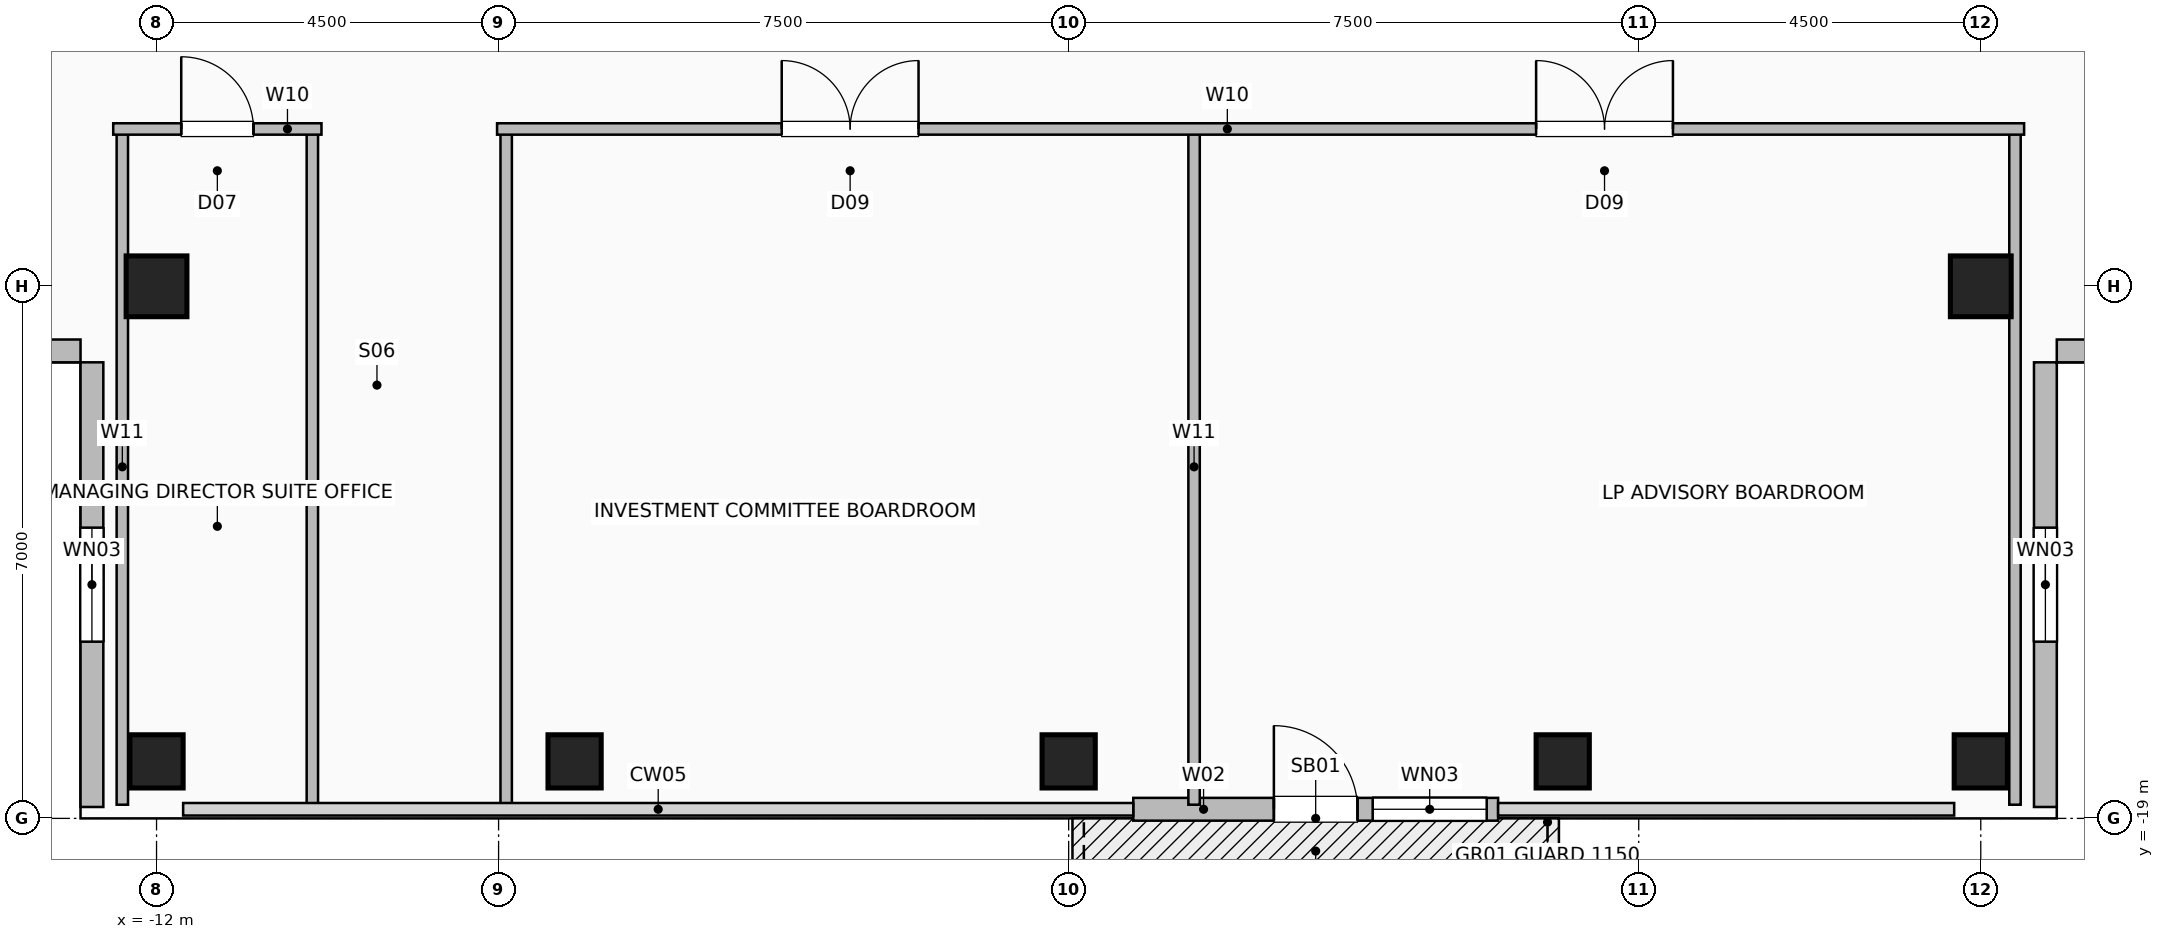
"""IFC4 building model, lengths in metres.
Left out: names, types, materials, properties, quantities, classifications, styles, units other than length and angle.
Written with IfcOpenShell. Run it as: python <this file> out.ifc"""

import sys

from ifc_helpers import new_model, si_unit, direction, frame, frame_2d, origin, origin_2d, place, context, subcontext, project, spatial, rectangle, hollow_rectangle, extrude, element, fill, save


model = new_model("IFC4")
c1 = context("Model", 3, precision=1e-05, world=origin(), true_north=direction((0.0, 1.0)))
c2 = subcontext(c1, "Body", "Model", "MODEL_VIEW")
j1 = project(units=[si_unit("LENGTHUNIT", "METRE"), si_unit("PLANEANGLEUNIT", "RADIAN")], contexts=[c1])
p1 = place(None, origin())
s1 = spatial("IfcSite", under=j1, at=p1, CompositionType="ELEMENT")
p2 = place(p1, origin())
s2 = spatial("IfcBuilding", under=s1, at=p2, CompositionType="ELEMENT")
p3 = place(p2, frame((0.0, 0.0, 275.6)))
s3 = spatial("IfcBuildingStorey", under=s2, at=p3, CompositionType="ELEMENT", Elevation=275.6)
for number, where, z_axis, x_axis in (
    (1, (-12.0, -18.25, 0.0), (0.0, 0.0, 1.0), (1.0, 0.0, 0.0)),
    (2, (-6.5, -18.25, 0.0), (0.0, 0.0, 1.0), (1.0, 0.0, 0.0)),
    (3, (0.0, -18.25, 0.0), (0.0, 0.0, 1.0), (1.0, 0.0, 0.0)),
    (4, (6.5, -18.25, 0.0), (0.0, 0.0, 1.0), (1.0, 0.0, 0.0)),
    (5, (12.0, -18.25, 0.0), (0.0, 0.0, 1.0), (1.0, 0.0, 0.0)),
):
    element("IfcColumn", number, at=place(p3, frame(where, z_axis=z_axis, x_axis=x_axis)), inside=s3, PredefinedType="COLUMN", context=c2, shape_type="SweptSolid", body=[
        extrude(hollow_rectangle(XDim=0.7, YDim=0.7, WallThickness=0.035, at=origin_2d()), origin(), (0.0, 0.0, 1.0), 3.6),
    ])
for number, where, z_axis, x_axis in (
    (6, (-12.0, -12.0, 0.0), (0.0, 0.0, 1.0), (1.0, 0.0, 0.0)),
    (7, (12.0, -12.0, 0.0), (0.0, 0.0, 1.0), (1.0, 0.0, 0.0)),
):
    element("IfcColumn", number, at=place(p3, frame(where, z_axis=z_axis, x_axis=x_axis)), inside=s3, PredefinedType="COLUMN", context=c2, shape_type="SweptSolid", body=[
        extrude(hollow_rectangle(XDim=0.8, YDim=0.8, WallThickness=0.04, at=origin_2d()), origin(), (0.0, 0.0, 1.0), 3.6),
    ])
p4 = place(p3, frame((0.85, -18.88, 0.0), z_axis=(0.0, 0.0, 1.0), x_axis=(1.0, 0.0, 0.0)))
e8 = element("IfcWall", 8, at=p4, inside=s3, PredefinedType="SOLIDWALL", context=c2, shape_type="SweptSolid", body=[
    extrude(rectangle(XDim=4.8, YDim=0.3, at=frame_2d((2.4, 0.0))), origin(), (0.0, 0.0, 1.0), 3.36),
])
p5 = place(p4, frame((1.85, 0.0, 0.0)))
e9 = element("IfcOpeningElement", 9, at=p5, cuts=e8, PredefinedType="OPENING", context=c2, shape_type="SweptSolid", body=[
    extrude(rectangle(XDim=1.1, YDim=2.2, at=frame_2d((0.55, 1.1))), frame((0.0, 0.16, 0.0), z_axis=(0.0, -1.0, 0.0), x_axis=(1.0, 0.0, 0.0)), (0.0, 0.0, 1.0), 0.32),
])
p6 = place(p4, frame((3.15, 0.0, 0.85)))
e10 = element("IfcOpeningElement", 10, at=p6, cuts=e8, PredefinedType="OPENING", context=c2, shape_type="SweptSolid", body=[
    extrude(rectangle(XDim=1.5, YDim=1.8, at=frame_2d((0.75, 0.9))), frame((0.0, 0.16, 0.0), z_axis=(0.0, -1.0, 0.0), x_axis=(1.0, 0.0, 0.0)), (0.0, 0.0, 1.0), 0.32),
])
p7 = place(p3, frame((-12.85, -18.85, 0.0), z_axis=(0.0, 0.0, 1.0), x_axis=(0.0, 1.0, 0.0)))
e11 = element("IfcWall", 11, at=p7, inside=s3, PredefinedType="SOLIDWALL", context=c2, shape_type="SweptSolid", body=[
    extrude(rectangle(XDim=5.85, YDim=0.3, at=frame_2d((2.925, 0.0))), origin(), (0.0, 0.0, 1.0), 3.36),
])
p8 = place(p7, frame((2.175, 0.0, 0.9)))
e12 = element("IfcOpeningElement", 12, at=p8, cuts=e11, PredefinedType="OPENING", context=c2, shape_type="SweptSolid", body=[
    extrude(rectangle(XDim=1.5, YDim=1.8, at=frame_2d((0.75, 0.9))), frame((0.0, 0.16, 0.0), z_axis=(0.0, -1.0, 0.0), x_axis=(1.0, 0.0, 0.0)), (0.0, 0.0, 1.0), 0.32),
])
p9 = place(p3, frame((-18.85, -12.85, 0.0), z_axis=(0.0, 0.0, 1.0), x_axis=(1.0, 0.0, 0.0)))
e13 = element("IfcWall", 13, at=p9, inside=s3, PredefinedType="SOLIDWALL", context=c2, shape_type="SweptSolid", body=[
    extrude(rectangle(XDim=5.85, YDim=0.3, at=frame_2d((2.925, 0.0))), origin(), (0.0, 0.0, 1.0), 3.36),
])
p10 = place(p3, frame((12.85, -18.85, 0.0), z_axis=(0.0, 0.0, 1.0), x_axis=(0.0, 1.0, 0.0)))
e14 = element("IfcWall", 14, at=p10, inside=s3, PredefinedType="SOLIDWALL", context=c2, shape_type="SweptSolid", body=[
    extrude(rectangle(XDim=5.85, YDim=0.3, at=frame_2d((2.925, 0.0))), origin(), (0.0, 0.0, 1.0), 3.36),
])
p11 = place(p10, frame((2.175, 0.0, 0.9)))
e15 = element("IfcOpeningElement", 15, at=p11, cuts=e14, PredefinedType="OPENING", context=c2, shape_type="SweptSolid", body=[
    extrude(rectangle(XDim=1.5, YDim=1.8, at=frame_2d((0.75, 0.9))), frame((0.0, 0.16, 0.0), z_axis=(0.0, -1.0, 0.0), x_axis=(1.0, 0.0, 0.0)), (0.0, 0.0, 1.0), 0.32),
])
p12 = place(p3, frame((18.85, -12.85, 0.0), z_axis=(0.0, 0.0, 1.0), x_axis=(-1.0, 0.0, 0.0)))
e16 = element("IfcWall", 16, at=p12, inside=s3, PredefinedType="SOLIDWALL", context=c2, shape_type="SweptSolid", body=[
    extrude(rectangle(XDim=5.85, YDim=0.3, at=frame_2d((2.925, 0.0))), origin(), (0.0, 0.0, 1.0), 3.36),
])
for number, where, z_axis, x_axis in (
    (17, (-12.45, -18.82, 0.0), (0.0, 0.0, 1.0), (0.0, 1.0, 0.0)),
    (18, (-9.95, -18.82, 0.0), (0.0, 0.0, 1.0), (0.0, 1.0, 0.0)),
):
    element("IfcWall", number, at=place(p3, frame(where, z_axis=z_axis, x_axis=x_axis)), inside=s3, PredefinedType="PARTITIONING", context=c2, shape_type="SweptSolid", body=[
        extrude(rectangle(XDim=8.89, YDim=0.15, at=frame_2d((4.445, 0.0))), origin(), (0.0, 0.0, 1.0), 3.36),
    ])
p13 = place(p3, frame((-12.57, -9.93, 0.0), z_axis=(0.0, 0.0, 1.0), x_axis=(1.0, 0.0, 0.0)))
e19 = element("IfcWall", 19, at=p13, inside=s3, PredefinedType="PARTITIONING", context=c2, shape_type="SweptSolid", body=[
    extrude(rectangle(XDim=2.74, YDim=0.15, at=frame_2d((1.37, 0.0))), origin(), (0.0, 0.0, 1.0), 3.36),
])
p14 = place(p13, frame((0.895, 0.0, 0.0)))
e20 = element("IfcOpeningElement", 20, at=p14, cuts=e19, PredefinedType="OPENING", context=c2, shape_type="SweptSolid", body=[
    extrude(rectangle(XDim=0.95, YDim=2.06, at=frame_2d((0.475, 1.03))), frame((0.0, 0.085, 0.0), z_axis=(0.0, -1.0, 0.0), x_axis=(1.0, 0.0, 0.0)), (0.0, 0.0, 1.0), 0.17),
])
for number, where, z_axis, x_axis in (
    (21, (-7.4, -18.82, 0.0), (0.0, 0.0, 1.0), (0.0, 1.0, 0.0)),
    (22, (1.65, -18.82, 0.0), (0.0, 0.0, 1.0), (0.0, 1.0, 0.0)),
    (23, (12.45, -18.82, 0.0), (0.0, 0.0, 1.0), (0.0, 1.0, 0.0)),
):
    element("IfcWall", number, at=place(p3, frame(where, z_axis=z_axis, x_axis=x_axis)), inside=s3, PredefinedType="PARTITIONING", context=c2, shape_type="SweptSolid", body=[
        extrude(rectangle(XDim=8.89, YDim=0.15, at=frame_2d((4.445, 0.0))), origin(), (0.0, 0.0, 1.0), 3.36),
    ])
p15 = place(p3, frame((-7.52, -9.93, 0.0), z_axis=(0.0, 0.0, 1.0), x_axis=(1.0, 0.0, 0.0)))
e24 = element("IfcWall", 24, at=p15, inside=s3, PredefinedType="PARTITIONING", context=c2, shape_type="SweptSolid", body=[
    extrude(rectangle(XDim=20.09, YDim=0.15, at=frame_2d((10.045, 0.0))), origin(), (0.0, 0.0, 1.0), 3.36),
])
p16 = place(p15, frame((3.745, 0.0, 0.0)))
e25 = element("IfcOpeningElement", 25, at=p16, cuts=e24, PredefinedType="OPENING", context=c2, shape_type="SweptSolid", body=[
    extrude(rectangle(XDim=1.8, YDim=2.08, at=frame_2d((0.9, 1.04))), frame((0.0, 0.085, 0.0), z_axis=(0.0, -1.0, 0.0), x_axis=(1.0, 0.0, 0.0)), (0.0, 0.0, 1.0), 0.17),
])
p17 = place(p15, frame((13.67, 0.0, 0.0)))
e26 = element("IfcOpeningElement", 26, at=p17, cuts=e24, PredefinedType="OPENING", context=c2, shape_type="SweptSolid", body=[
    extrude(rectangle(XDim=1.8, YDim=2.08, at=frame_2d((0.9, 1.04))), frame((0.0, 0.085, 0.0), z_axis=(0.0, -1.0, 0.0), x_axis=(1.0, 0.0, 0.0)), (0.0, 0.0, 1.0), 0.17),
])
p18 = place(p5, origin())
e27 = element("IfcDoor", 27, at=p18, inside=s3, OperationType="SINGLE_SWING_LEFT", PredefinedType="DOOR", context=c2, shape_type="SweptSolid", body=[
    extrude(rectangle(XDim=1.1, YDim=2.2, at=frame_2d((0.55, 1.1))), frame((0.0, 0.025, 0.0), z_axis=(0.0, -1.0, 0.0), x_axis=(1.0, 0.0, 0.0)), (0.0, 0.0, 1.0), 0.05),
])
fill(e9, e27)
p19 = place(p6, origin())
e28 = element("IfcWindow", 28, at=p19, inside=s3, PartitioningType="SINGLE_PANEL", PredefinedType="WINDOW", context=c2, shape_type="SweptSolid", body=[
    extrude(rectangle(XDim=1.5, YDim=1.8, at=frame_2d((0.75, 0.9))), frame((0.0, 0.03, 0.0), z_axis=(0.0, -1.0, 0.0), x_axis=(1.0, 0.0, 0.0)), (0.0, 0.0, 1.0), 0.06),
])
fill(e10, e28)
p20 = place(p8, origin())
e29 = element("IfcWindow", 29, at=p20, inside=s3, PartitioningType="SINGLE_PANEL", PredefinedType="WINDOW", context=c2, shape_type="SweptSolid", body=[
    extrude(rectangle(XDim=1.5, YDim=1.8, at=frame_2d((0.75, 0.9))), frame((0.0, 0.03, 0.0), z_axis=(0.0, -1.0, 0.0), x_axis=(1.0, 0.0, 0.0)), (0.0, 0.0, 1.0), 0.06),
])
fill(e12, e29)
p21 = place(p11, origin())
e30 = element("IfcWindow", 30, at=p21, inside=s3, PartitioningType="SINGLE_PANEL", PredefinedType="WINDOW", context=c2, shape_type="SweptSolid", body=[
    extrude(rectangle(XDim=1.5, YDim=1.8, at=frame_2d((0.75, 0.9))), frame((0.0, 0.03, 0.0), z_axis=(0.0, -1.0, 0.0), x_axis=(1.0, 0.0, 0.0)), (0.0, 0.0, 1.0), 0.06),
])
fill(e15, e30)
p22 = place(p14, origin())
e31 = element("IfcDoor", 31, at=p22, inside=s3, OperationType="SINGLE_SWING_LEFT", PredefinedType="DOOR", context=c2, shape_type="SweptSolid", body=[
    extrude(rectangle(XDim=0.95, YDim=2.06, at=frame_2d((0.475, 1.03))), frame((0.0, 0.025, 0.0), z_axis=(0.0, -1.0, 0.0), x_axis=(1.0, 0.0, 0.0)), (0.0, 0.0, 1.0), 0.05),
])
fill(e20, e31)
p23 = place(p16, origin())
e32 = element("IfcDoor", 32, at=p23, inside=s3, OperationType="DOUBLE_DOOR_SINGLE_SWING", PredefinedType="DOOR", context=c2, shape_type="SweptSolid", body=[
    extrude(rectangle(XDim=1.8, YDim=2.08, at=frame_2d((0.9, 1.04))), frame((0.0, 0.025, 0.0), z_axis=(0.0, -1.0, 0.0), x_axis=(1.0, 0.0, 0.0)), (0.0, 0.0, 1.0), 0.05),
])
fill(e25, e32)
p24 = place(p17, origin())
e33 = element("IfcDoor", 33, at=p24, inside=s3, OperationType="DOUBLE_DOOR_SINGLE_SWING", PredefinedType="DOOR", context=c2, shape_type="SweptSolid", body=[
    extrude(rectangle(XDim=1.8, YDim=2.08, at=frame_2d((0.9, 1.04))), frame((0.0, 0.025, 0.0), z_axis=(0.0, -1.0, 0.0), x_axis=(1.0, 0.0, 0.0)), (0.0, 0.0, 1.0), 0.05),
])
fill(e26, e33)
save(model, sys.argv[1])
